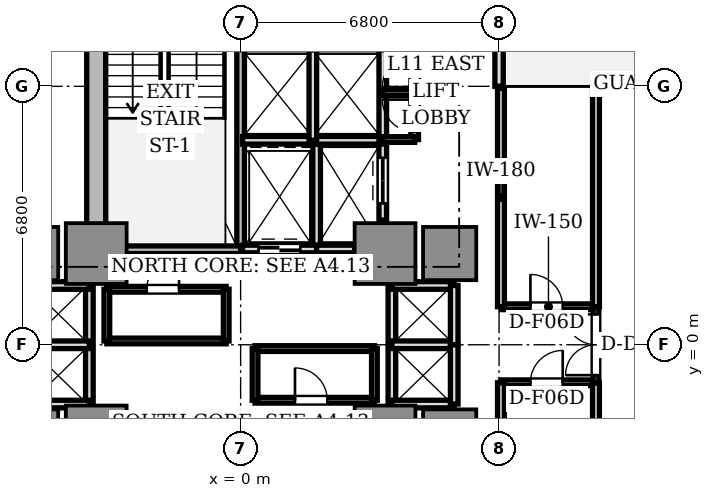
"""IFC4 building model, lengths in metres.
Left out: names, types, materials, properties, quantities, classifications, styles, units other than length and angle.
Written with IfcOpenShell. Run it as: python <this file> out.ifc"""

import sys

from ifc_helpers import new_model, si_unit, direction, frame, frame_2d, origin, origin_2d, place, context, subcontext, project, spatial, rectangle, extrude, source, transform, mapped, element, fill, save


model = new_model("IFC4")
c1 = context("Model", 3, precision=1e-05, world=origin(), true_north=direction((0.0, 1.0)))
c2 = subcontext(c1, "Body", "Model", "MODEL_VIEW")
j1 = project(units=[si_unit("LENGTHUNIT", "METRE"), si_unit("PLANEANGLEUNIT", "RADIAN")], contexts=[c1])
p1 = place(None, origin())
s1 = spatial("IfcSite", under=j1, at=p1, CompositionType="ELEMENT")
p2 = place(p1, origin())
s2 = spatial("IfcBuilding", under=s1, at=p2, CompositionType="ELEMENT")
p3 = place(p2, frame((0.0, 0.0, 43.2)))
s3 = spatial("IfcBuildingStorey", under=s2, at=p3, CompositionType="ELEMENT", Elevation=43.2)
p4 = place(p3, frame((-3.8, 2.85, 0.0), z_axis=(0.0, 0.0, 1.0), x_axis=(0.0, 1.0, 0.0)))
e1 = element("IfcWall", 1, at=p4, inside=s3, PredefinedType="SHEAR", context=c2, shape_type="SweptSolid", body=[
    extrude(rectangle(XDim=6.9, YDim=0.5, at=frame_2d((3.45, 0.0))), origin(), (0.0, 0.0, 1.0), 3.05),
])
m1 = source(origin(), c2, "Body", "SweptSolid", [
    extrude(rectangle(XDim=1.6, YDim=1.6, at=origin_2d()), origin(), (0.0, 0.0, 1.0), 3.05),
])
for number, where, z_axis, x_axis in (
    (2, (-3.8, 2.4, 0.0), (0.0, 0.0, 1.0), (1.0, 0.0, 0.0)),
    (3, (3.8, 2.4, 0.0), (0.0, 0.0, 1.0), (1.0, 0.0, 0.0)),
    (4, (-3.8, -2.4, 0.0), (0.0, 0.0, 1.0), (1.0, 0.0, 0.0)),
    (5, (3.8, -2.4, 0.0), (0.0, 0.0, 1.0), (1.0, 0.0, 0.0)),
):
    element("IfcColumn", number, at=place(p3, frame(where, z_axis=z_axis, x_axis=x_axis)), inside=s3, PredefinedType="COLUMN", context=c2, shape_type="MappedRepresentation", body=[
        mapped(m1, transform((0.0, 0.0, 0.0), scale=1.0)),
    ])
m2 = source(origin(), c2, "Body", "SweptSolid", [
    extrude(rectangle(XDim=1.4, YDim=1.4, at=origin_2d()), origin(), (0.0, 0.0, 1.0), 3.05),
])
for number, where, z_axis, x_axis in (
    (6, (5.5, 2.4, 0.0), (0.0, 0.0, 1.0), (1.0, 0.0, 0.0)),
    (7, (-5.5, 2.4, 0.0), (0.0, 0.0, 1.0), (1.0, 0.0, 0.0)),
    (8, (5.5, -2.4, 0.0), (0.0, 0.0, 1.0), (1.0, 0.0, 0.0)),
    (9, (-5.5, -2.4, 0.0), (0.0, 0.0, 1.0), (1.0, 0.0, 0.0)),
):
    element("IfcColumn", number, at=place(p3, frame(where, z_axis=z_axis, x_axis=x_axis)), inside=s3, PredefinedType="COLUMN", context=c2, shape_type="MappedRepresentation", body=[
        mapped(m2, transform((0.0, 0.0, 0.0), scale=1.0)),
    ])
p5 = place(p3, frame((6.8, 6.8, 0.0), z_axis=(0.0, 0.0, 1.0), x_axis=(0.0, 1.0, 0.0)))
e10 = element("IfcWall", 10, at=p5, inside=s3, PredefinedType="STANDARD", context=c2, shape_type="SweptSolid", body=[
    extrude(rectangle(XDim=2.7, YDim=0.22, at=frame_2d((1.35, 0.0))), origin(), (0.0, 0.0, 1.0), 3.05),
])
p6 = place(p5, frame((1.4, 0.0, 0.0)))
e11 = element("IfcOpeningElement", 11, at=p6, cuts=e10, PredefinedType="OPENING", context=c2, shape_type="SweptSolid", body=[
    extrude(rectangle(XDim=1.0, YDim=2.2, at=frame_2d((0.5, 1.1))), frame((0.0, 0.12, 0.0), z_axis=(0.0, -1.0, 0.0), x_axis=(1.0, 0.0, 0.0)), (0.0, 0.0, 1.0), 0.24),
])
p7 = place(p3, frame((0.0, 2.5, 0.0), z_axis=(0.0, 0.0, 1.0), x_axis=(0.0, 1.0, 0.0)))
e12 = element("IfcWall", 12, at=p7, inside=s3, PredefinedType="SOLIDWALL", context=c2, shape_type="SweptSolid", body=[
    extrude(rectangle(XDim=7.68, YDim=0.2, at=frame_2d((3.84, 0.0))), origin(), (0.0, 0.0, 1.0), 3.05),
])
p8 = place(p7, frame((6.5, 0.0, 0.0)))
e13 = element("IfcOpeningElement", 13, at=p8, cuts=e12, PredefinedType="OPENING", context=c2, shape_type="SweptSolid", body=[
    extrude(rectangle(XDim=0.95, YDim=2.15, at=frame_2d((0.475, 1.075))), frame((0.0, 0.11, 0.0), z_axis=(0.0, -1.0, 0.0), x_axis=(1.0, 0.0, 0.0)), (0.0, 0.0, 1.0), 0.22),
])
p9 = place(p3, frame((-3.72, 2.5, 0.0), z_axis=(0.0, 0.0, 1.0), x_axis=(1.0, 0.0, 0.0)))
e14 = element("IfcWall", 14, at=p9, inside=s3, PredefinedType="SOLIDWALL", context=c2, shape_type="SweptSolid", body=[
    extrude(rectangle(XDim=3.72, YDim=0.2, at=frame_2d((1.86, 0.0))), origin(), (0.0, 0.0, 1.0), 3.05),
])
p10 = place(p3, frame((2.0, 2.5, 0.0), z_axis=(0.0, 0.0, 1.0), x_axis=(0.0, 1.0, 0.0)))
e15 = element("IfcWall", 15, at=p10, inside=s3, PredefinedType="SOLIDWALL", context=c2, shape_type="SweptSolid", body=[
    extrude(rectangle(XDim=2.78, YDim=0.2, at=frame_2d((1.39, 0.0))), origin(), (0.0, 0.0, 1.0), 2.6),
])
p11 = place(p3, frame((0.05, 2.52, 0.0), z_axis=(0.0, 0.0, 1.0), x_axis=(1.0, 0.0, 0.0)))
e16 = element("IfcWall", 16, at=p11, inside=s3, PredefinedType="SOLIDWALL", context=c2, shape_type="SweptSolid", body=[
    extrude(rectangle(XDim=1.95, YDim=0.2, at=frame_2d((0.975, 0.0))), origin(), (0.0, 0.0, 1.0), 2.6),
])
p12 = place(p11, frame((0.42, 0.0, 0.0)))
e17 = element("IfcOpeningElement", 17, at=p12, cuts=e16, PredefinedType="OPENING", context=c2, shape_type="SweptSolid", body=[
    extrude(rectangle(XDim=1.1, YDim=2.2, at=frame_2d((0.55, 1.1))), frame((0.0, 0.11, 0.0), z_axis=(0.0, -1.0, 0.0), x_axis=(1.0, 0.0, 0.0)), (0.0, 0.0, 1.0), 0.22),
])
p13 = place(p3, frame((2.0, 2.52, 0.0), z_axis=(0.0, 0.0, 1.0), x_axis=(1.0, 0.0, 0.0)))
e18 = element("IfcWall", 18, at=p13, inside=s3, PredefinedType="SOLIDWALL", context=c2, shape_type="SweptSolid", body=[
    extrude(rectangle(XDim=1.0, YDim=0.2, at=frame_2d((0.5, 0.0))), origin(), (0.0, 0.0, 1.0), 2.6),
])
p14 = place(p3, frame((3.74, 3.28, 0.0), z_axis=(0.0, 0.0, 1.0), x_axis=(0.0, 1.0, 0.0)))
e19 = element("IfcWall", 19, at=p14, inside=s3, PredefinedType="SOLIDWALL", context=c2, shape_type="SweptSolid", body=[
    extrude(rectangle(XDim=2.08, YDim=0.2, at=frame_2d((1.04, 0.0))), origin(), (0.0, 0.0, 1.0), 2.6),
])
p15 = place(p14, frame((0.44, 0.0, 0.0)))
e20 = element("IfcOpeningElement", 20, at=p15, cuts=e19, PredefinedType="OPENING", context=c2, shape_type="SweptSolid", body=[
    extrude(rectangle(XDim=1.2, YDim=2.2, at=frame_2d((0.6, 1.1))), frame((0.0, 0.11, 0.0), z_axis=(0.0, -1.0, 0.0), x_axis=(1.0, 0.0, 0.0)), (0.0, 0.0, 1.0), 0.22),
])
p16 = place(p3, frame((0.05, 5.38, 0.0), z_axis=(0.0, 0.0, 1.0), x_axis=(1.0, 0.0, 0.0)))
e21 = element("IfcWall", 21, at=p16, inside=s3, PredefinedType="SOLIDWALL", context=c2, shape_type="SweptSolid", body=[
    extrude(rectangle(XDim=3.69, YDim=0.2, at=frame_2d((1.845, 0.0))), origin(), (0.0, 0.0, 1.0), 2.6),
])
for number, where, z_axis, x_axis in (
    (22, (1.9, 5.38, 0.0), (0.0, 0.0, 1.0), (0.0, 1.0, 0.0)),
    (23, (3.74, 5.38, 0.0), (0.0, 0.0, 1.0), (0.0, 1.0, 0.0)),
):
    element("IfcWall", number, at=place(p3, frame(where, z_axis=z_axis, x_axis=x_axis)), inside=s3, PredefinedType="SOLIDWALL", context=c2, shape_type="SweptSolid", body=[
        extrude(rectangle(XDim=2.48, YDim=0.2, at=frame_2d((1.24, 0.0))), origin(), (0.0, 0.0, 1.0), 2.6),
    ])
p17 = place(p3, frame((3.98, -1.56, 0.0), z_axis=(0.0, 0.0, 1.0), x_axis=(0.0, 1.0, 0.0)))
e24 = element("IfcWall", 24, at=p17, inside=s3, PredefinedType="SOLIDWALL", context=c2, shape_type="SweptSolid", body=[
    extrude(rectangle(XDim=3.12, YDim=0.2, at=frame_2d((1.56, 0.0))), origin(), (0.0, 0.0, 1.0), 2.12),
])
for number, where, z_axis, x_axis in (
    (25, (3.98, 1.56, 0.0), (0.0, 0.0, 1.0), (1.0, 0.0, 0.0)),
    (26, (3.98, -1.56, 0.0), (0.0, 0.0, 1.0), (1.0, 0.0, 0.0)),
    (27, (3.98, 0.0, 0.0), (0.0, 0.0, 1.0), (1.0, 0.0, 0.0)),
):
    element("IfcWall", number, at=place(p3, frame(where, z_axis=z_axis, x_axis=x_axis)), inside=s3, PredefinedType="SOLIDWALL", context=c2, shape_type="SweptSolid", body=[
        extrude(rectangle(XDim=1.64, YDim=0.2, at=frame_2d((0.82, 0.0))), origin(), (0.0, 0.0, 1.0), 2.6),
    ])
for number, where, z_axis, x_axis in (
    (28, (5.62, 0.0, 0.0), (0.0, 0.0, 1.0), (0.0, 1.0, 0.0)),
    (29, (5.62, -1.56, 0.0), (0.0, 0.0, 1.0), (0.0, 1.0, 0.0)),
):
    element("IfcWall", number, at=place(p3, frame(where, z_axis=z_axis, x_axis=x_axis)), inside=s3, PredefinedType="SOLIDWALL", context=c2, shape_type="SweptSolid", body=[
        extrude(rectangle(XDim=1.56, YDim=0.2, at=frame_2d((0.78, 0.0))), origin(), (0.0, 0.0, 1.0), 2.6),
    ])
p18 = place(p3, frame((-3.98, -1.56, 0.0), z_axis=(0.0, 0.0, 1.0), x_axis=(0.0, 1.0, 0.0)))
e30 = element("IfcWall", 30, at=p18, inside=s3, PredefinedType="SOLIDWALL", context=c2, shape_type="SweptSolid", body=[
    extrude(rectangle(XDim=3.12, YDim=0.2, at=frame_2d((1.56, 0.0))), origin(), (0.0, 0.0, 1.0), 2.12),
])
for number, where, z_axis, x_axis in (
    (31, (-5.62, 1.56, 0.0), (0.0, 0.0, 1.0), (1.0, 0.0, 0.0)),
    (32, (-5.62, -1.56, 0.0), (0.0, 0.0, 1.0), (1.0, 0.0, 0.0)),
    (33, (-5.62, 0.0, 0.0), (0.0, 0.0, 1.0), (1.0, 0.0, 0.0)),
):
    element("IfcWall", number, at=place(p3, frame(where, z_axis=z_axis, x_axis=x_axis)), inside=s3, PredefinedType="SOLIDWALL", context=c2, shape_type="SweptSolid", body=[
        extrude(rectangle(XDim=1.64, YDim=0.2, at=frame_2d((0.82, 0.0))), origin(), (0.0, 0.0, 1.0), 2.6),
    ])
p19 = place(p3, frame((4.58, 5.4, 0.0), z_axis=(0.0, 0.0, 1.0), x_axis=(0.0, 1.0, 0.0)))
e34 = element("IfcWall", 34, at=p19, inside=s3, PredefinedType="SOLIDWALL", context=c2, shape_type="SweptSolid", body=[
    extrude(rectangle(XDim=2.46, YDim=0.2, at=frame_2d((1.23, 0.0))), origin(), (0.0, 0.0, 1.0), 2.6),
])
p20 = place(p19, frame((0.2, 0.0, 0.0)))
e35 = element("IfcOpeningElement", 35, at=p20, cuts=e34, PredefinedType="OPENING", context=c2, shape_type="SweptSolid", body=[
    extrude(rectangle(XDim=0.85, YDim=2.1, at=frame_2d((0.425, 1.05))), frame((0.0, 0.11, 0.0), z_axis=(0.0, -1.0, 0.0), x_axis=(1.0, 0.0, 0.0)), (0.0, 0.0, 1.0), 0.22),
])
p21 = place(p19, frame((1.38, 0.0, 0.0)))
e36 = element("IfcOpeningElement", 36, at=p21, cuts=e34, PredefinedType="OPENING", context=c2, shape_type="SweptSolid", body=[
    extrude(rectangle(XDim=0.85, YDim=2.1, at=frame_2d((0.425, 1.05))), frame((0.0, 0.11, 0.0), z_axis=(0.0, -1.0, 0.0), x_axis=(1.0, 0.0, 0.0)), (0.0, 0.0, 1.0), 0.22),
])
for number, where, z_axis, x_axis in (
    (37, (3.74, 5.4, 0.0), (0.0, 0.0, 1.0), (1.0, 0.0, 0.0)),
    (38, (3.74, 6.63, 0.0), (0.0, 0.0, 1.0), (1.0, 0.0, 0.0)),
):
    element("IfcWall", number, at=place(p3, frame(where, z_axis=z_axis, x_axis=x_axis)), inside=s3, PredefinedType="PARTITIONING", context=c2, shape_type="SweptSolid", body=[
        extrude(rectangle(XDim=0.84, YDim=0.15, at=frame_2d((0.42, 0.0))), origin(), (0.0, 0.0, 1.0), 2.6),
    ])
p22 = place(p3, frame((-3.52, 0.1, 0.0), z_axis=(0.0, 0.0, 1.0), x_axis=(1.0, 0.0, 0.0)))
e39 = element("IfcWall", 39, at=p22, inside=s3, PredefinedType="PARTITIONING", context=c2, shape_type="SweptSolid", body=[
    extrude(rectangle(XDim=3.14, YDim=0.15, at=frame_2d((1.57, 0.0))), origin(), (0.0, 0.0, 1.0), 2.6),
])
p23 = place(p3, frame((-3.52, 1.46, 0.0), z_axis=(0.0, 0.0, 1.0), x_axis=(1.0, 0.0, 0.0)))
e40 = element("IfcWall", 40, at=p23, inside=s3, PredefinedType="PARTITIONING", context=c2, shape_type="SweptSolid", body=[
    extrude(rectangle(XDim=3.14, YDim=0.15, at=frame_2d((1.57, 0.0))), origin(), (0.0, 0.0, 1.0), 2.6),
])
p24 = place(p23, frame((1.05, 0.0, 0.0)))
e41 = element("IfcOpeningElement", 41, at=p24, cuts=e40, PredefinedType="OPENING", context=c2, shape_type="SweptSolid", body=[
    extrude(rectangle(XDim=0.85, YDim=2.1, at=frame_2d((0.425, 1.05))), frame((0.0, 0.085, 0.0), z_axis=(0.0, -1.0, 0.0), x_axis=(1.0, 0.0, 0.0)), (0.0, 0.0, 1.0), 0.17),
])
p25 = place(p3, frame((-3.52, 0.1, 0.0), z_axis=(0.0, 0.0, 1.0), x_axis=(0.0, 1.0, 0.0)))
e42 = element("IfcWall", 42, at=p25, inside=s3, PredefinedType="PARTITIONING", context=c2, shape_type="SweptSolid", body=[
    extrude(rectangle(XDim=1.36, YDim=0.15, at=frame_2d((0.68, 0.0))), origin(), (0.0, 0.0, 1.0), 2.12),
])
p26 = place(p3, frame((-0.38, 0.1, 0.0), z_axis=(0.0, 0.0, 1.0), x_axis=(0.0, 1.0, 0.0)))
e43 = element("IfcWall", 43, at=p26, inside=s3, PredefinedType="PARTITIONING", context=c2, shape_type="SweptSolid", body=[
    extrude(rectangle(XDim=1.36, YDim=0.15, at=frame_2d((0.68, 0.0))), origin(), (0.0, 0.0, 1.0), 2.6),
])
p27 = place(p3, frame((0.38, -0.1, 0.0), z_axis=(0.0, 0.0, 1.0), x_axis=(1.0, 0.0, 0.0)))
e44 = element("IfcWall", 44, at=p27, inside=s3, PredefinedType="PARTITIONING", context=c2, shape_type="SweptSolid", body=[
    extrude(rectangle(XDim=3.14, YDim=0.15, at=frame_2d((1.57, 0.0))), origin(), (0.0, 0.0, 1.0), 2.6),
])
p28 = place(p3, frame((0.38, -1.46, 0.0), z_axis=(0.0, 0.0, 1.0), x_axis=(1.0, 0.0, 0.0)))
e45 = element("IfcWall", 45, at=p28, inside=s3, PredefinedType="PARTITIONING", context=c2, shape_type="SweptSolid", body=[
    extrude(rectangle(XDim=3.14, YDim=0.15, at=frame_2d((1.57, 0.0))), origin(), (0.0, 0.0, 1.0), 2.6),
])
p29 = place(p28, frame((1.05, 0.0, 0.0)))
e46 = element("IfcOpeningElement", 46, at=p29, cuts=e45, PredefinedType="OPENING", context=c2, shape_type="SweptSolid", body=[
    extrude(rectangle(XDim=0.85, YDim=2.1, at=frame_2d((0.425, 1.05))), frame((0.0, 0.085, 0.0), z_axis=(0.0, -1.0, 0.0), x_axis=(1.0, 0.0, 0.0)), (0.0, 0.0, 1.0), 0.17),
])
p30 = place(p3, frame((0.38, -1.46, 0.0), z_axis=(0.0, 0.0, 1.0), x_axis=(0.0, 1.0, 0.0)))
e47 = element("IfcWall", 47, at=p30, inside=s3, PredefinedType="PARTITIONING", context=c2, shape_type="SweptSolid", body=[
    extrude(rectangle(XDim=1.36, YDim=0.15, at=frame_2d((0.68, 0.0))), origin(), (0.0, 0.0, 1.0), 2.6),
])
p31 = place(p3, frame((3.52, -1.46, 0.0), z_axis=(0.0, 0.0, 1.0), x_axis=(0.0, 1.0, 0.0)))
e48 = element("IfcWall", 48, at=p31, inside=s3, PredefinedType="PARTITIONING", context=c2, shape_type="SweptSolid", body=[
    extrude(rectangle(XDim=1.36, YDim=0.15, at=frame_2d((0.68, 0.0))), origin(), (0.0, 0.0, 1.0), 2.12),
])
p32 = place(p3, frame((6.85, 1.0, 0.0), z_axis=(0.0, 0.0, 1.0), x_axis=(1.0, 0.0, 0.0)))
e49 = element("IfcWall", 49, at=p32, inside=s3, PredefinedType="PARTITIONING", context=c2, shape_type="SweptSolid", body=[
    extrude(rectangle(XDim=2.5, YDim=0.15, at=frame_2d((1.25, 0.0))), origin(), (0.0, 0.0, 1.0), 2.6),
])
p33 = place(p32, frame((0.775, 0.0, 0.0)))
e50 = element("IfcOpeningElement", 50, at=p33, cuts=e49, PredefinedType="OPENING", context=c2, shape_type="SweptSolid", body=[
    extrude(rectangle(XDim=0.85, YDim=2.1, at=frame_2d((0.425, 1.05))), frame((0.0, 0.085, 0.0), z_axis=(0.0, -1.0, 0.0), x_axis=(1.0, 0.0, 0.0)), (0.0, 0.0, 1.0), 0.17),
])
p34 = place(p3, frame((6.85, -1.0, 0.0), z_axis=(0.0, 0.0, 1.0), x_axis=(1.0, 0.0, 0.0)))
e51 = element("IfcWall", 51, at=p34, inside=s3, PredefinedType="PARTITIONING", context=c2, shape_type="SweptSolid", body=[
    extrude(rectangle(XDim=2.5, YDim=0.15, at=frame_2d((1.25, 0.0))), origin(), (0.0, 0.0, 1.0), 2.6),
])
p35 = place(p34, frame((0.775, 0.0, 0.0)))
e52 = element("IfcOpeningElement", 52, at=p35, cuts=e51, PredefinedType="OPENING", context=c2, shape_type="SweptSolid", body=[
    extrude(rectangle(XDim=0.85, YDim=2.1, at=frame_2d((0.425, 1.05))), frame((0.0, 0.085, 0.0), z_axis=(0.0, -1.0, 0.0), x_axis=(1.0, 0.0, 0.0)), (0.0, 0.0, 1.0), 0.17),
])
for number, where, z_axis, x_axis in (
    (53, (6.85, 1.0, 0.0), (0.0, 0.0, 1.0), (0.0, 1.0, 0.0)),
    (54, (6.85, -6.75, 0.0), (0.0, 0.0, 1.0), (0.0, 1.0, 0.0)),
    (55, (9.35, -1.0, 0.0), (0.0, 0.0, 1.0), (0.0, -1.0, 0.0)),
    (56, (9.35, 1.0, 0.0), (0.0, 0.0, 1.0), (0.0, 1.0, 0.0)),
):
    element("IfcWall", number, at=place(p3, frame(where, z_axis=z_axis, x_axis=x_axis)), inside=s3, PredefinedType="PARTITIONING", context=c2, shape_type="SweptSolid", body=[
        extrude(rectangle(XDim=5.75, YDim=0.18, at=frame_2d((2.875, 0.0))), origin(), (0.0, 0.0, 1.0), 2.6),
    ])
p36 = place(p3, frame((9.35, -1.0, 0.0), z_axis=(0.0, 0.0, 1.0), x_axis=(0.0, 1.0, 0.0)))
e57 = element("IfcWall", 57, at=p36, inside=s3, PredefinedType="PARTITIONING", context=c2, shape_type="SweptSolid", body=[
    extrude(rectangle(XDim=2.0, YDim=0.15, at=frame_2d((1.0, 0.0))), origin(), (0.0, 0.0, 1.0), 2.6),
])
p37 = place(p36, frame((0.2, 0.0, 0.0)))
e58 = element("IfcOpeningElement", 58, at=p37, cuts=e57, PredefinedType="OPENING", context=c2, shape_type="SweptSolid", body=[
    extrude(rectangle(XDim=1.6, YDim=2.25, at=frame_2d((0.8, 1.125))), frame((0.0, 0.085, 0.0), z_axis=(0.0, -1.0, 0.0), x_axis=(1.0, 0.0, 0.0)), (0.0, 0.0, 1.0), 0.17),
])
m3 = source(origin(), c2, "Body", "SweptSolid", [
    extrude(rectangle(XDim=1.1, YDim=0.05, at=origin_2d()), origin(), (0.0, 0.0, 1.0), 2.2),
])
p38 = place(p12, frame((0.55, 0.0, 0.0)))
e59 = element("IfcDoor", 59, at=p38, inside=s3, OperationType="DOUBLE_DOOR_SLIDING", PredefinedType="DOOR", context=c2, shape_type="MappedRepresentation", body=[
    mapped(m3, transform((0.0, 0.0, 0.0), scale=1.0)),
])
fill(e17, e59)
m4 = source(origin(), c2, "Body", "SweptSolid", [
    extrude(rectangle(XDim=1.2, YDim=0.05, at=origin_2d()), origin(), (0.0, 0.0, 1.0), 2.2),
])
p39 = place(p15, frame((0.6, 0.0, 0.0)))
e60 = element("IfcDoor", 60, at=p39, inside=s3, OperationType="DOUBLE_DOOR_SLIDING", PredefinedType="DOOR", context=c2, shape_type="MappedRepresentation", body=[
    mapped(m4, transform((0.0, 0.0, 0.0), scale=1.0)),
])
fill(e20, e60)
m5 = source(origin(), c2, "Body", "SweptSolid", [
    extrude(rectangle(XDim=0.85, YDim=0.05, at=origin_2d()), origin(), (0.0, 0.0, 1.0), 2.1),
])
p40 = place(p20, frame((0.425, 0.0, 0.0)))
e61 = element("IfcDoor", 61, at=p40, inside=s3, OperationType="SINGLE_SWING_RIGHT", PredefinedType="DOOR", context=c2, shape_type="MappedRepresentation", body=[
    mapped(m5, transform((0.0, 0.0, 0.0), scale=1.0)),
])
fill(e35, e61)
p41 = place(p21, frame((0.425, 0.0, 0.0)))
e62 = element("IfcDoor", 62, at=p41, inside=s3, OperationType="SINGLE_SWING_LEFT", PredefinedType="DOOR", context=c2, shape_type="MappedRepresentation", body=[
    mapped(m5, transform((0.0, 0.0, 0.0), scale=1.0)),
])
fill(e36, e62)
p42 = place(p24, frame((0.425, 0.0, 0.0)))
e63 = element("IfcDoor", 63, at=p42, inside=s3, OperationType="SINGLE_SWING_RIGHT", PredefinedType="DOOR", context=c2, shape_type="MappedRepresentation", body=[
    mapped(m5, transform((0.0, 0.0, 0.0), scale=1.0)),
])
fill(e41, e63)
p43 = place(p29, frame((0.425, 0.0, 0.0)))
e64 = element("IfcDoor", 64, at=p43, inside=s3, OperationType="SINGLE_SWING_LEFT", PredefinedType="DOOR", context=c2, shape_type="MappedRepresentation", body=[
    mapped(m5, transform((0.0, 0.0, 0.0), scale=1.0)),
])
fill(e46, e64)
p44 = place(p35, frame((0.425, 0.0, 0.0)))
e65 = element("IfcDoor", 65, at=p44, inside=s3, OperationType="SINGLE_SWING_RIGHT", PredefinedType="DOOR", context=c2, shape_type="MappedRepresentation", body=[
    mapped(m5, transform((0.0, 0.0, 0.0), scale=1.0)),
])
fill(e52, e65)
p45 = place(p33, frame((0.425, 0.0, 0.0)))
e66 = element("IfcDoor", 66, at=p45, inside=s3, OperationType="SINGLE_SWING_LEFT", PredefinedType="DOOR", context=c2, shape_type="MappedRepresentation", body=[
    mapped(m5, transform((0.0, 0.0, 0.0), scale=1.0)),
])
fill(e50, e66)
m6 = source(origin(), c2, "Body", "SweptSolid", [
    extrude(rectangle(XDim=1.6, YDim=0.05, at=origin_2d()), origin(), (0.0, 0.0, 1.0), 2.25),
])
p46 = place(p37, frame((0.8, 0.0, 0.0)))
e67 = element("IfcDoor", 67, at=p46, inside=s3, OperationType="DOUBLE_DOOR_SINGLE_SWING", PredefinedType="DOOR", context=c2, shape_type="MappedRepresentation", body=[
    mapped(m6, transform((0.0, 0.0, 0.0), scale=1.0)),
])
fill(e58, e67)
save(model, sys.argv[1])
